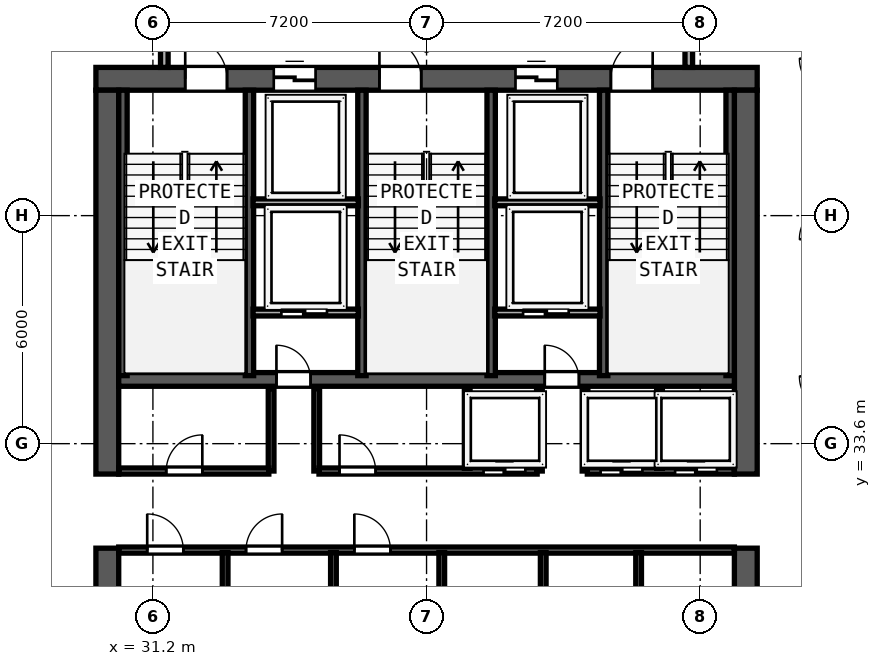
"""IFC4 building model, lengths in metres.
Left out: names, types, materials, properties, quantities, classifications, styles, units other than length and angle.
Written with IfcOpenShell. Run it as: python <this file> out.ifc"""

import sys

from ifc_helpers import new_model, si_unit, direction, frame, frame_2d, origin, place, context, subcontext, project, spatial, rectangle, extrude, element, fill, save


model = new_model("IFC4")
c1 = context("Model", 3, precision=1e-05, world=origin(), true_north=direction((0.0, 1.0)))
c2 = subcontext(c1, "Body", "Model", "MODEL_VIEW")
j1 = project(units=[si_unit("LENGTHUNIT", "METRE"), si_unit("PLANEANGLEUNIT", "RADIAN")], contexts=[c1])
p1 = place(None, origin())
s1 = spatial("IfcSite", under=j1, at=p1, CompositionType="ELEMENT")
p2 = place(p1, origin())
s2 = spatial("IfcBuilding", under=s1, at=p2, CompositionType="ELEMENT")
p3 = place(p2, frame((0.0, 0.0, 215.4)))
s3 = spatial("IfcBuildingStorey", under=s2, at=p3, CompositionType="ELEMENT", Elevation=215.4)
p4 = place(p3, frame((29.7, 43.2, 0.0), z_axis=(0.0, 0.0, 1.0), x_axis=(1.0, 0.0, 0.0)))
e1 = element("IfcWall", 1, at=p4, inside=s3, PredefinedType="SHEAR", context=c2, shape_type="SweptSolid", body=[
    extrude(rectangle(XDim=17.4, YDim=0.6, at=frame_2d((8.7, 0.0))), origin(), (0.0, 0.0, 1.0), 3.62),
])
p5 = place(p4, frame((2.35, 0.0, 0.0)))
e2 = element("IfcOpeningElement", 2, at=p5, cuts=e1, PredefinedType="OPENING", context=c2, shape_type="SweptSolid", body=[
    extrude(rectangle(XDim=1.1, YDim=2.15, at=frame_2d((0.55, 1.075))), frame((0.0, 0.31, 0.0), z_axis=(0.0, -1.0, 0.0), x_axis=(1.0, 0.0, 0.0)), (0.0, 0.0, 1.0), 0.62),
])
p6 = place(p4, frame((7.46, 0.0, 0.0)))
e3 = element("IfcOpeningElement", 3, at=p6, cuts=e1, PredefinedType="OPENING", context=c2, shape_type="SweptSolid", body=[
    extrude(rectangle(XDim=1.1, YDim=2.15, at=frame_2d((0.55, 1.075))), frame((0.0, 0.31, 0.0), z_axis=(0.0, -1.0, 0.0), x_axis=(1.0, 0.0, 0.0)), (0.0, 0.0, 1.0), 0.62),
])
p7 = place(p4, frame((13.55, 0.0, 0.0)))
e4 = element("IfcOpeningElement", 4, at=p7, cuts=e1, PredefinedType="OPENING", context=c2, shape_type="SweptSolid", body=[
    extrude(rectangle(XDim=1.1, YDim=2.15, at=frame_2d((0.55, 1.075))), frame((0.0, 0.31, 0.0), z_axis=(0.0, -1.0, 0.0), x_axis=(1.0, 0.0, 0.0)), (0.0, 0.0, 1.0), 0.62),
])
p8 = place(p4, frame((4.68, 0.0, 0.0)))
e5 = element("IfcOpeningElement", 5, at=p8, cuts=e1, PredefinedType="OPENING", context=c2, shape_type="SweptSolid", body=[
    extrude(rectangle(XDim=1.1, YDim=2.2, at=frame_2d((0.55, 1.1))), frame((0.0, 0.31, 0.0), z_axis=(0.0, -1.0, 0.0), x_axis=(1.0, 0.0, 0.0)), (0.0, 0.0, 1.0), 0.62),
])
p9 = place(p4, frame((11.04, 0.0, 0.0)))
e6 = element("IfcOpeningElement", 6, at=p9, cuts=e1, PredefinedType="OPENING", context=c2, shape_type="SweptSolid", body=[
    extrude(rectangle(XDim=1.1, YDim=2.2, at=frame_2d((0.55, 1.1))), frame((0.0, 0.31, 0.0), z_axis=(0.0, -1.0, 0.0), x_axis=(1.0, 0.0, 0.0)), (0.0, 0.0, 1.0), 0.62),
])
p10 = place(p3, frame((30.0, 26.7, 0.0), z_axis=(0.0, 0.0, 1.0), x_axis=(0.0, 1.0, 0.0)))
e7 = element("IfcWall", 7, at=p10, inside=s3, PredefinedType="SHEAR", context=c2, shape_type="SweptSolid", body=[
    extrude(rectangle(XDim=4.15, YDim=0.6, at=frame_2d((2.075, 0.0))), origin(), (0.0, 0.0, 1.0), 3.62),
])
p11 = place(p3, frame((30.0, 32.8, 0.0), z_axis=(0.0, 0.0, 1.0), x_axis=(0.0, 1.0, 0.0)))
e8 = element("IfcWall", 8, at=p11, inside=s3, PredefinedType="SHEAR", context=c2, shape_type="SweptSolid", body=[
    extrude(rectangle(XDim=10.1, YDim=0.6, at=frame_2d((5.05, 0.0))), origin(), (0.0, 0.0, 1.0), 3.62),
])
p12 = place(p3, frame((46.8, 26.7, 0.0), z_axis=(0.0, 0.0, 1.0), x_axis=(0.0, 1.0, 0.0)))
e9 = element("IfcWall", 9, at=p12, inside=s3, PredefinedType="SHEAR", context=c2, shape_type="SweptSolid", body=[
    extrude(rectangle(XDim=4.15, YDim=0.6, at=frame_2d((2.075, 0.0))), origin(), (0.0, 0.0, 1.0), 3.62),
])
p13 = place(p3, frame((46.8, 32.8, 0.0), z_axis=(0.0, 0.0, 1.0), x_axis=(0.0, 1.0, 0.0)))
e10 = element("IfcWall", 10, at=p13, inside=s3, PredefinedType="SHEAR", context=c2, shape_type="SweptSolid", body=[
    extrude(rectangle(XDim=10.1, YDim=0.6, at=frame_2d((5.05, 0.0))), origin(), (0.0, 0.0, 1.0), 3.62),
])
p14 = place(p3, frame((30.3, 35.29, 0.0), z_axis=(0.0, 0.0, 1.0), x_axis=(1.0, 0.0, 0.0)))
e11 = element("IfcWall", 11, at=p14, inside=s3, PredefinedType="SHEAR", context=c2, shape_type="SweptSolid", body=[
    extrude(rectangle(XDim=16.2, YDim=0.36, at=frame_2d((8.1, 0.0))), origin(), (0.0, 0.0, 1.0), 3.62),
])
p15 = place(p14, frame((5.05, 0.0, 0.0), z_axis=(0.0, 0.0, 1.0), x_axis=(-1.0, 0.0, 0.0)))
e12 = element("IfcOpeningElement", 12, at=p15, cuts=e11, PredefinedType="OPENING", context=c2, shape_type="SweptSolid", body=[
    extrude(rectangle(XDim=0.9, YDim=2.1, at=frame_2d((0.45, 1.05))), frame((0.0, 0.19, 0.0), z_axis=(0.0, -1.0, 0.0), x_axis=(1.0, 0.0, 0.0)), (0.0, 0.0, 1.0), 0.38),
])
p16 = place(p14, frame((12.11, 0.0, 0.0), z_axis=(0.0, 0.0, 1.0), x_axis=(-1.0, 0.0, 0.0)))
e13 = element("IfcOpeningElement", 13, at=p16, cuts=e11, PredefinedType="OPENING", context=c2, shape_type="SweptSolid", body=[
    extrude(rectangle(XDim=0.9, YDim=2.1, at=frame_2d((0.45, 1.05))), frame((0.0, 0.19, 0.0), z_axis=(0.0, -1.0, 0.0), x_axis=(1.0, 0.0, 0.0)), (0.0, 0.0, 1.0), 0.38),
])
for number, where, z_axis, x_axis in (
    (14, (30.412, 35.39, 0.0), (0.0, 0.0, 1.0), (0.0, 1.0, 0.0)),
    (15, (33.74, 35.39, 0.0), (0.0, 0.0, 1.0), (0.0, 1.0, 0.0)),
    (16, (36.7, 35.39, 0.0), (0.0, 0.0, 1.0), (0.0, 1.0, 0.0)),
    (17, (40.1, 35.39, 0.0), (0.0, 0.0, 1.0), (0.0, 1.0, 0.0)),
    (18, (43.06, 35.39, 0.0), (0.0, 0.0, 1.0), (0.0, 1.0, 0.0)),
    (19, (46.388, 35.39, 0.0), (0.0, 0.0, 1.0), (0.0, 1.0, 0.0)),
):
    element("IfcWall", number, at=place(p3, frame(where, z_axis=z_axis, x_axis=x_axis)), inside=s3, PredefinedType="SHEAR", context=c2, shape_type="SweptSolid", body=[
        extrude(rectangle(XDim=7.51, YDim=0.22, at=frame_2d((3.755, 0.0))), origin(), (0.0, 0.0, 1.0), 3.62),
    ])
p17 = place(p3, frame((31.5, 43.5, 0.0), z_axis=(0.0, 0.0, 1.0), x_axis=(0.0, 1.0, 0.0)))
e20 = element("IfcWall", 20, at=p17, inside=s3, PredefinedType="SOLIDWALL", context=c2, shape_type="SweptSolid", body=[
    extrude(rectangle(XDim=2.935, YDim=0.2, at=frame_2d((1.468, 0.0))), origin(), (0.0, 0.0, 1.0), 3.62),
])
p18 = place(p17, frame((1.8, 0.0, 0.0), z_axis=(0.0, 0.0, 1.0), x_axis=(-1.0, 0.0, 0.0)))
e21 = element("IfcOpeningElement", 21, at=p18, cuts=e20, PredefinedType="OPENING", context=c2, shape_type="SweptSolid", body=[
    extrude(rectangle(XDim=1.1, YDim=2.15, at=frame_2d((0.55, 1.075))), frame((0.0, 0.11, 0.0), z_axis=(0.0, -1.0, 0.0), x_axis=(1.0, 0.0, 0.0)), (0.0, 0.0, 1.0), 0.22),
])
p19 = place(p3, frame((45.3, 43.5, 0.0), z_axis=(0.0, 0.0, 1.0), x_axis=(0.0, 1.0, 0.0)))
e22 = element("IfcWall", 22, at=p19, inside=s3, PredefinedType="SOLIDWALL", context=c2, shape_type="SweptSolid", body=[
    extrude(rectangle(XDim=2.935, YDim=0.2, at=frame_2d((1.468, 0.0))), origin(), (0.0, 0.0, 1.0), 3.62),
])
p20 = place(p19, frame((0.7, 0.0, 0.0)))
e23 = element("IfcOpeningElement", 23, at=p20, cuts=e22, PredefinedType="OPENING", context=c2, shape_type="SweptSolid", body=[
    extrude(rectangle(XDim=1.1, YDim=2.15, at=frame_2d((0.55, 1.075))), frame((0.0, 0.11, 0.0), z_axis=(0.0, -1.0, 0.0), x_axis=(1.0, 0.0, 0.0)), (0.0, 0.0, 1.0), 0.22),
])
for number, where, z_axis, x_axis in (
    (24, (33.835, 39.95, 0.0), (0.0, 0.0, 1.0), (1.0, 0.0, 0.0)),
    (25, (40.195, 39.95, 0.0), (0.0, 0.0, 1.0), (1.0, 0.0, 0.0)),
):
    element("IfcWall", number, at=place(p3, frame(where, z_axis=z_axis, x_axis=x_axis)), inside=s3, PredefinedType="SOLIDWALL", context=c2, shape_type="SweptSolid", body=[
        extrude(rectangle(XDim=2.77, YDim=0.18, at=frame_2d((1.385, 0.0))), origin(), (0.0, 0.0, 1.0), 3.62),
    ])
p21 = place(p3, frame((33.835, 37.05, 0.0), z_axis=(0.0, 0.0, 1.0), x_axis=(1.0, 0.0, 0.0)))
e26 = element("IfcWall", 26, at=p21, inside=s3, PredefinedType="SOLIDWALL", context=c2, shape_type="SweptSolid", body=[
    extrude(rectangle(XDim=2.77, YDim=0.18, at=frame_2d((1.385, 0.0))), origin(), (0.0, 0.0, 1.0), 3.62),
])
p22 = place(p21, frame((1.945, 0.0, 0.0), z_axis=(0.0, 0.0, 1.0), x_axis=(-1.0, 0.0, 0.0)))
e27 = element("IfcOpeningElement", 27, at=p22, cuts=e26, PredefinedType="OPENING", context=c2, shape_type="SweptSolid", body=[
    extrude(rectangle(XDim=1.2, YDim=2.2, at=frame_2d((0.6, 1.1))), frame((0.0, 0.1, 0.0), z_axis=(0.0, -1.0, 0.0), x_axis=(1.0, 0.0, 0.0)), (0.0, 0.0, 1.0), 0.2),
])
for number, where, z_axis, x_axis in (
    (28, (34.31, 32.88, 0.0), (0.0, 0.0, 1.0), (0.0, 1.0, 0.0)),
    (29, (35.51, 32.88, 0.0), (0.0, 0.0, 1.0), (0.0, 1.0, 0.0)),
):
    element("IfcWall", number, at=place(p3, frame(where, z_axis=z_axis, x_axis=x_axis)), inside=s3, PredefinedType="SOLIDWALL", context=c2, shape_type="SweptSolid", body=[
        extrude(rectangle(XDim=2.17, YDim=0.15, at=frame_2d((1.085, 0.0))), origin(), (0.0, 0.0, 1.0), 3.62),
    ])
p23 = place(p3, frame((40.195, 37.05, 0.0), z_axis=(0.0, 0.0, 1.0), x_axis=(1.0, 0.0, 0.0)))
e30 = element("IfcWall", 30, at=p23, inside=s3, PredefinedType="SOLIDWALL", context=c2, shape_type="SweptSolid", body=[
    extrude(rectangle(XDim=2.77, YDim=0.18, at=frame_2d((1.385, 0.0))), origin(), (0.0, 0.0, 1.0), 3.62),
])
p24 = place(p23, frame((1.945, 0.0, 0.0), z_axis=(0.0, 0.0, 1.0), x_axis=(-1.0, 0.0, 0.0)))
e31 = element("IfcOpeningElement", 31, at=p24, cuts=e30, PredefinedType="OPENING", context=c2, shape_type="SweptSolid", body=[
    extrude(rectangle(XDim=1.2, YDim=2.2, at=frame_2d((0.6, 1.1))), frame((0.0, 0.1, 0.0), z_axis=(0.0, -1.0, 0.0), x_axis=(1.0, 0.0, 0.0)), (0.0, 0.0, 1.0), 0.2),
])
for number, where, z_axis, x_axis in (
    (32, (41.37, 32.88, 0.0), (0.0, 0.0, 1.0), (0.0, 1.0, 0.0)),
    (33, (42.57, 32.88, 0.0), (0.0, 0.0, 1.0), (0.0, 1.0, 0.0)),
):
    element("IfcWall", number, at=place(p3, frame(where, z_axis=z_axis, x_axis=x_axis)), inside=s3, PredefinedType="SOLIDWALL", context=c2, shape_type="SweptSolid", body=[
        extrude(rectangle(XDim=2.17, YDim=0.15, at=frame_2d((1.085, 0.0))), origin(), (0.0, 0.0, 1.0), 3.62),
    ])
p25 = place(p3, frame((30.3, 32.88, 0.0), z_axis=(0.0, 0.0, 1.0), x_axis=(1.0, 0.0, 0.0)))
e34 = element("IfcWall", 34, at=p25, inside=s3, PredefinedType="SOLIDWALL", context=c2, shape_type="SweptSolid", body=[
    extrude(rectangle(XDim=3.95, YDim=0.16, at=frame_2d((1.975, 0.0))), origin(), (0.0, 0.0, 1.0), 3.62),
])
p26 = place(p25, frame((2.2, 0.0, 0.0), z_axis=(0.0, 0.0, 1.0), x_axis=(-1.0, 0.0, 0.0)))
e35 = element("IfcOpeningElement", 35, at=p26, cuts=e34, PredefinedType="OPENING", context=c2, shape_type="SweptSolid", body=[
    extrude(rectangle(XDim=0.95, YDim=2.12, at=frame_2d((0.475, 1.06))), frame((0.0, 0.09, 0.0), z_axis=(0.0, -1.0, 0.0), x_axis=(1.0, 0.0, 0.0)), (0.0, 0.0, 1.0), 0.18),
])
p27 = place(p3, frame((35.57, 32.88, 0.0), z_axis=(0.0, 0.0, 1.0), x_axis=(1.0, 0.0, 0.0)))
e36 = element("IfcWall", 36, at=p27, inside=s3, PredefinedType="SOLIDWALL", context=c2, shape_type="SweptSolid", body=[
    extrude(rectangle(XDim=5.74, YDim=0.16, at=frame_2d((2.87, 0.0))), origin(), (0.0, 0.0, 1.0), 3.62),
])
p28 = place(p27, frame((1.49, 0.0, 0.0), z_axis=(0.0, 0.0, 1.0), x_axis=(-1.0, 0.0, 0.0)))
e37 = element("IfcOpeningElement", 37, at=p28, cuts=e36, PredefinedType="OPENING", context=c2, shape_type="SweptSolid", body=[
    extrude(rectangle(XDim=0.95, YDim=2.12, at=frame_2d((0.475, 1.06))), frame((0.0, 0.09, 0.0), z_axis=(0.0, -1.0, 0.0), x_axis=(1.0, 0.0, 0.0)), (0.0, 0.0, 1.0), 0.18),
])
p29 = place(p27, frame((5.43, 0.0, 0.0), z_axis=(0.0, 0.0, 1.0), x_axis=(-1.0, 0.0, 0.0)))
e38 = element("IfcOpeningElement", 38, at=p29, cuts=e36, PredefinedType="OPENING", context=c2, shape_type="SweptSolid", body=[
    extrude(rectangle(XDim=1.1, YDim=2.2, at=frame_2d((0.55, 1.1))), frame((0.0, 0.09, 0.0), z_axis=(0.0, -1.0, 0.0), x_axis=(1.0, 0.0, 0.0)), (0.0, 0.0, 1.0), 0.18),
])
p30 = place(p3, frame((42.63, 32.88, 0.0), z_axis=(0.0, 0.0, 1.0), x_axis=(1.0, 0.0, 0.0)))
e39 = element("IfcWall", 39, at=p30, inside=s3, PredefinedType="SOLIDWALL", context=c2, shape_type="SweptSolid", body=[
    extrude(rectangle(XDim=3.87, YDim=0.16, at=frame_2d((1.935, 0.0))), origin(), (0.0, 0.0, 1.0), 3.62),
])
p31 = place(p30, frame((1.45, 0.0, 0.0), z_axis=(0.0, 0.0, 1.0), x_axis=(-1.0, 0.0, 0.0)))
e40 = element("IfcOpeningElement", 40, at=p31, cuts=e39, PredefinedType="OPENING", context=c2, shape_type="SweptSolid", body=[
    extrude(rectangle(XDim=1.1, YDim=2.2, at=frame_2d((0.55, 1.1))), frame((0.0, 0.09, 0.0), z_axis=(0.0, -1.0, 0.0), x_axis=(1.0, 0.0, 0.0)), (0.0, 0.0, 1.0), 0.18),
])
p32 = place(p30, frame((3.41, 0.0, 0.0), z_axis=(0.0, 0.0, 1.0), x_axis=(-1.0, 0.0, 0.0)))
e41 = element("IfcOpeningElement", 41, at=p32, cuts=e39, PredefinedType="OPENING", context=c2, shape_type="SweptSolid", body=[
    extrude(rectangle(XDim=1.1, YDim=2.2, at=frame_2d((0.55, 1.1))), frame((0.0, 0.09, 0.0), z_axis=(0.0, -1.0, 0.0), x_axis=(1.0, 0.0, 0.0)), (0.0, 0.0, 1.0), 0.18),
])
for number, where, z_axis, x_axis in (
    (42, (39.47, 32.95, 0.0), (0.0, 0.0, 1.0), (0.0, 1.0, 0.0)),
    (43, (44.53, 32.95, 0.0), (0.0, 0.0, 1.0), (0.0, 1.0, 0.0)),
):
    element("IfcWall", number, at=place(p3, frame(where, z_axis=z_axis, x_axis=x_axis)), inside=s3, PredefinedType="SOLIDWALL", context=c2, shape_type="SweptSolid", body=[
        extrude(rectangle(XDim=2.05, YDim=0.15, at=frame_2d((1.025, 0.0))), origin(), (0.0, 0.0, 1.0), 3.62),
    ])
p33 = place(p3, frame((30.3, 30.8, 0.0), z_axis=(0.0, 0.0, 1.0), x_axis=(1.0, 0.0, 0.0)))
e44 = element("IfcWall", 44, at=p33, inside=s3, PredefinedType="SOLIDWALL", context=c2, shape_type="SweptSolid", body=[
    extrude(rectangle(XDim=16.2, YDim=0.16, at=frame_2d((8.1, 0.0))), origin(), (0.0, 0.0, 1.0), 3.62),
])
p34 = place(p33, frame((0.75, 0.0, 0.0)))
e45 = element("IfcOpeningElement", 45, at=p34, cuts=e44, PredefinedType="OPENING", context=c2, shape_type="SweptSolid", body=[
    extrude(rectangle(XDim=0.95, YDim=2.12, at=frame_2d((0.475, 1.06))), frame((0.0, 0.09, 0.0), z_axis=(0.0, -1.0, 0.0), x_axis=(1.0, 0.0, 0.0)), (0.0, 0.0, 1.0), 0.18),
])
p35 = place(p33, frame((3.35, 0.0, 0.0)))
e46 = element("IfcOpeningElement", 46, at=p35, cuts=e44, PredefinedType="OPENING", context=c2, shape_type="SweptSolid", body=[
    extrude(rectangle(XDim=0.95, YDim=2.12, at=frame_2d((0.475, 1.06))), frame((0.0, 0.09, 0.0), z_axis=(0.0, -1.0, 0.0), x_axis=(1.0, 0.0, 0.0)), (0.0, 0.0, 1.0), 0.18),
])
p36 = place(p33, frame((6.2, 0.0, 0.0)))
e47 = element("IfcOpeningElement", 47, at=p36, cuts=e44, PredefinedType="OPENING", context=c2, shape_type="SweptSolid", body=[
    extrude(rectangle(XDim=0.95, YDim=2.12, at=frame_2d((0.475, 1.06))), frame((0.0, 0.09, 0.0), z_axis=(0.0, -1.0, 0.0), x_axis=(1.0, 0.0, 0.0)), (0.0, 0.0, 1.0), 0.18),
])
p37 = place(p3, frame((38.8, 26.71, 0.0), z_axis=(0.0, 0.0, 1.0), x_axis=(0.0, 1.0, 0.0)))
e48 = element("IfcWall", 48, at=p37, inside=s3, PredefinedType="SOLIDWALL", context=c2, shape_type="SweptSolid", body=[
    extrude(rectangle(XDim=4.025, YDim=0.15, at=frame_2d((2.013, 0.0))), origin(), (0.0, 0.0, 1.0), 3.62),
])
for number, where, z_axis, x_axis in (
    (49, (33.1, 26.71, 0.0), (0.0, 0.0, 1.0), (0.0, 1.0, 0.0)),
    (50, (35.95, 26.71, 0.0), (0.0, 0.0, 1.0), (0.0, 1.0, 0.0)),
):
    element("IfcWall", number, at=place(p3, frame(where, z_axis=z_axis, x_axis=x_axis)), inside=s3, PredefinedType="PARTITIONING", context=c2, shape_type="SweptSolid", body=[
        extrude(rectangle(XDim=4.025, YDim=0.15, at=frame_2d((2.013, 0.0))), origin(), (0.0, 0.0, 1.0), 3.62),
    ])
for number, where, z_axis, x_axis in (
    (51, (41.47, 28.75, 0.0), (0.0, 0.0, 1.0), (0.0, 1.0, 0.0)),
    (52, (43.98, 28.75, 0.0), (0.0, 0.0, 1.0), (0.0, 1.0, 0.0)),
):
    element("IfcWall", number, at=place(p3, frame(where, z_axis=z_axis, x_axis=x_axis)), inside=s3, PredefinedType="SOLIDWALL", context=c2, shape_type="SweptSolid", body=[
        extrude(rectangle(XDim=1.985, YDim=0.15, at=frame_2d((0.993, 0.0))), origin(), (0.0, 0.0, 1.0), 3.62),
    ])
p38 = place(p5, origin())
e53 = element("IfcDoor", 53, at=p38, inside=s3, OperationType="SINGLE_SWING_LEFT", PredefinedType="DOOR", context=c2, shape_type="SweptSolid", body=[
    extrude(rectangle(XDim=1.1, YDim=2.15, at=frame_2d((0.55, 1.075))), frame((0.0, 0.185, 0.0), z_axis=(0.0, -1.0, 0.0), x_axis=(1.0, 0.0, 0.0)), (0.0, 0.0, 1.0), 0.05),
])
fill(e2, e53)
p39 = place(p6, origin())
e54 = element("IfcDoor", 54, at=p39, inside=s3, OperationType="SINGLE_SWING_LEFT", PredefinedType="DOOR", context=c2, shape_type="SweptSolid", body=[
    extrude(rectangle(XDim=1.1, YDim=2.15, at=frame_2d((0.55, 1.075))), frame((0.0, 0.185, 0.0), z_axis=(0.0, -1.0, 0.0), x_axis=(1.0, 0.0, 0.0)), (0.0, 0.0, 1.0), 0.05),
])
fill(e3, e54)
p40 = place(p7, origin())
e55 = element("IfcDoor", 55, at=p40, inside=s3, OperationType="SINGLE_SWING_RIGHT", PredefinedType="DOOR", context=c2, shape_type="SweptSolid", body=[
    extrude(rectangle(XDim=1.1, YDim=2.15, at=frame_2d((0.55, 1.075))), frame((0.0, 0.185, 0.0), z_axis=(0.0, -1.0, 0.0), x_axis=(1.0, 0.0, 0.0)), (0.0, 0.0, 1.0), 0.05),
])
fill(e4, e55)
p41 = place(p8, origin())
e56 = element("IfcDoor", 56, at=p41, inside=s3, OperationType="SLIDING_TO_LEFT", PredefinedType="DOOR", context=c2, shape_type="SweptSolid", body=[
    extrude(rectangle(XDim=1.1, YDim=2.2, at=frame_2d((0.55, 1.1))), frame((0.0, 0.185, 0.0), z_axis=(0.0, -1.0, 0.0), x_axis=(1.0, 0.0, 0.0)), (0.0, 0.0, 1.0), 0.05),
])
fill(e5, e56)
p42 = place(p9, origin())
e57 = element("IfcDoor", 57, at=p42, inside=s3, OperationType="SLIDING_TO_LEFT", PredefinedType="DOOR", context=c2, shape_type="SweptSolid", body=[
    extrude(rectangle(XDim=1.1, YDim=2.2, at=frame_2d((0.55, 1.1))), frame((0.0, 0.185, 0.0), z_axis=(0.0, -1.0, 0.0), x_axis=(1.0, 0.0, 0.0)), (0.0, 0.0, 1.0), 0.05),
])
fill(e6, e57)
p43 = place(p22, origin())
e58 = element("IfcDoor", 58, at=p43, inside=s3, OperationType="SLIDING_TO_RIGHT", PredefinedType="DOOR", context=c2, shape_type="SweptSolid", body=[
    extrude(rectangle(XDim=1.2, YDim=2.2, at=frame_2d((0.6, 1.1))), frame((0.0, 0.025, 0.0), z_axis=(0.0, -1.0, 0.0), x_axis=(1.0, 0.0, 0.0)), (0.0, 0.0, 1.0), 0.05),
])
fill(e27, e58)
p44 = place(p15, origin())
e59 = element("IfcDoor", 59, at=p44, inside=s3, OperationType="SINGLE_SWING_RIGHT", PredefinedType="DOOR", context=c2, shape_type="SweptSolid", body=[
    extrude(rectangle(XDim=0.9, YDim=2.1, at=frame_2d((0.45, 1.05))), frame((0.0, 0.025, 0.0), z_axis=(0.0, -1.0, 0.0), x_axis=(1.0, 0.0, 0.0)), (0.0, 0.0, 1.0), 0.05),
])
fill(e12, e59)
p45 = place(p24, origin())
e60 = element("IfcDoor", 60, at=p45, inside=s3, OperationType="SLIDING_TO_RIGHT", PredefinedType="DOOR", context=c2, shape_type="SweptSolid", body=[
    extrude(rectangle(XDim=1.2, YDim=2.2, at=frame_2d((0.6, 1.1))), frame((0.0, 0.025, 0.0), z_axis=(0.0, -1.0, 0.0), x_axis=(1.0, 0.0, 0.0)), (0.0, 0.0, 1.0), 0.05),
])
fill(e31, e60)
p46 = place(p16, origin())
e61 = element("IfcDoor", 61, at=p46, inside=s3, OperationType="SINGLE_SWING_RIGHT", PredefinedType="DOOR", context=c2, shape_type="SweptSolid", body=[
    extrude(rectangle(XDim=0.9, YDim=2.1, at=frame_2d((0.45, 1.05))), frame((0.0, 0.025, 0.0), z_axis=(0.0, -1.0, 0.0), x_axis=(1.0, 0.0, 0.0)), (0.0, 0.0, 1.0), 0.05),
])
fill(e13, e61)
p47 = place(p26, origin())
e62 = element("IfcDoor", 62, at=p47, inside=s3, OperationType="SINGLE_SWING_LEFT", PredefinedType="DOOR", context=c2, shape_type="SweptSolid", body=[
    extrude(rectangle(XDim=0.95, YDim=2.12, at=frame_2d((0.475, 1.06))), frame((0.0, 0.025, 0.0), z_axis=(0.0, -1.0, 0.0), x_axis=(1.0, 0.0, 0.0)), (0.0, 0.0, 1.0), 0.05),
])
fill(e35, e62)
p48 = place(p28, origin())
e63 = element("IfcDoor", 63, at=p48, inside=s3, OperationType="SINGLE_SWING_RIGHT", PredefinedType="DOOR", context=c2, shape_type="SweptSolid", body=[
    extrude(rectangle(XDim=0.95, YDim=2.12, at=frame_2d((0.475, 1.06))), frame((0.0, 0.025, 0.0), z_axis=(0.0, -1.0, 0.0), x_axis=(1.0, 0.0, 0.0)), (0.0, 0.0, 1.0), 0.05),
])
fill(e37, e63)
p49 = place(p29, origin())
e64 = element("IfcDoor", 64, at=p49, inside=s3, OperationType="SLIDING_TO_RIGHT", PredefinedType="DOOR", context=c2, shape_type="SweptSolid", body=[
    extrude(rectangle(XDim=1.1, YDim=2.2, at=frame_2d((0.55, 1.1))), frame((0.0, 0.025, 0.0), z_axis=(0.0, -1.0, 0.0), x_axis=(1.0, 0.0, 0.0)), (0.0, 0.0, 1.0), 0.05),
])
fill(e38, e64)
p50 = place(p31, origin())
e65 = element("IfcDoor", 65, at=p50, inside=s3, OperationType="SLIDING_TO_RIGHT", PredefinedType="DOOR", context=c2, shape_type="SweptSolid", body=[
    extrude(rectangle(XDim=1.1, YDim=2.2, at=frame_2d((0.55, 1.1))), frame((0.0, 0.025, 0.0), z_axis=(0.0, -1.0, 0.0), x_axis=(1.0, 0.0, 0.0)), (0.0, 0.0, 1.0), 0.05),
])
fill(e40, e65)
p51 = place(p32, origin())
e66 = element("IfcDoor", 66, at=p51, inside=s3, OperationType="SLIDING_TO_RIGHT", PredefinedType="DOOR", context=c2, shape_type="SweptSolid", body=[
    extrude(rectangle(XDim=1.1, YDim=2.2, at=frame_2d((0.55, 1.1))), frame((0.0, 0.025, 0.0), z_axis=(0.0, -1.0, 0.0), x_axis=(1.0, 0.0, 0.0)), (0.0, 0.0, 1.0), 0.05),
])
fill(e41, e66)
p52 = place(p34, origin())
e67 = element("IfcDoor", 67, at=p52, inside=s3, OperationType="SINGLE_SWING_LEFT", PredefinedType="DOOR", context=c2, shape_type="SweptSolid", body=[
    extrude(rectangle(XDim=0.95, YDim=2.12, at=frame_2d((0.475, 1.06))), frame((0.0, 0.025, 0.0), z_axis=(0.0, -1.0, 0.0), x_axis=(1.0, 0.0, 0.0)), (0.0, 0.0, 1.0), 0.05),
])
fill(e45, e67)
p53 = place(p35, origin())
e68 = element("IfcDoor", 68, at=p53, inside=s3, OperationType="SINGLE_SWING_RIGHT", PredefinedType="DOOR", context=c2, shape_type="SweptSolid", body=[
    extrude(rectangle(XDim=0.95, YDim=2.12, at=frame_2d((0.475, 1.06))), frame((0.0, 0.025, 0.0), z_axis=(0.0, -1.0, 0.0), x_axis=(1.0, 0.0, 0.0)), (0.0, 0.0, 1.0), 0.05),
])
fill(e46, e68)
p54 = place(p36, origin())
e69 = element("IfcDoor", 69, at=p54, inside=s3, OperationType="SINGLE_SWING_LEFT", PredefinedType="DOOR", context=c2, shape_type="SweptSolid", body=[
    extrude(rectangle(XDim=0.95, YDim=2.12, at=frame_2d((0.475, 1.06))), frame((0.0, 0.025, 0.0), z_axis=(0.0, -1.0, 0.0), x_axis=(1.0, 0.0, 0.0)), (0.0, 0.0, 1.0), 0.05),
])
fill(e47, e69)
save(model, sys.argv[1])
